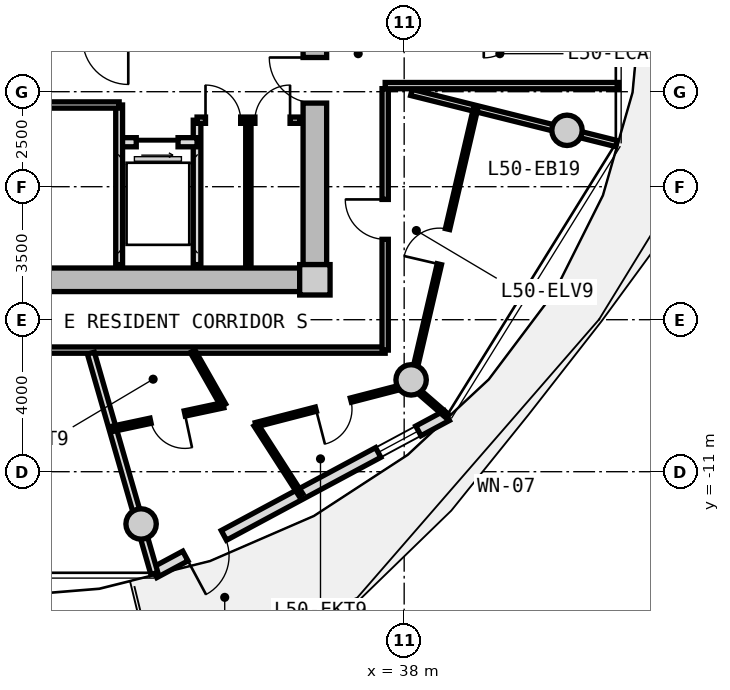
"""IFC4 building model, lengths in metres.
Left out: names, types, materials, properties, quantities, classifications, styles, units other than length and angle.
Written with IfcOpenShell. Run it as: python <this file> out.ifc"""

import sys

from ifc_helpers import new_model, si_unit, direction, frame, frame_2d, origin, origin_2d, place, context, subcontext, project, spatial, rectangle, circle, extrude, source, transform, mapped, element, fill, save


model = new_model("IFC4")
c1 = context("Model", 3, precision=1e-05, world=origin(), true_north=direction((0.0, 1.0)))
c2 = subcontext(c1, "Body", "Model", "MODEL_VIEW")
j1 = project(units=[si_unit("LENGTHUNIT", "METRE"), si_unit("PLANEANGLEUNIT", "RADIAN")], contexts=[c1])
p1 = place(None, origin())
s1 = spatial("IfcSite", under=j1, at=p1, CompositionType="ELEMENT")
p2 = place(p1, origin())
s2 = spatial("IfcBuilding", under=s1, at=p2, CompositionType="ELEMENT")
p3 = place(p2, frame((0.0, 0.0, 161.75)))
s3 = spatial("IfcBuildingStorey", under=s2, at=p3, CompositionType="ELEMENT", Elevation=161.75)
m1 = source(origin(), c2, "Body", "SweptSolid", [
    extrude(rectangle(XDim=0.8, YDim=0.8, at=origin_2d()), origin(), (0.0, 0.0, 1.0), 3.05),
])
p4 = place(p3, frame((35.65, -5.95, 0.0), z_axis=(0.0, 0.0, 1.0), x_axis=(1.0, 0.0, 0.0)))
e1 = element("IfcColumn", 1, at=p4, inside=s3, PredefinedType="COLUMN", context=c2, shape_type="MappedRepresentation", body=[
    mapped(m1, transform((0.0, 0.0, 0.0), x_axis=(1.0, 0.0, 0.0), y_axis=(0.0, 1.0, 0.0), z_axis=(0.0, 0.0, 1.0), scale=1.0)),
])
m2 = source(origin(), c2, "Body", "SweptSolid", [
    extrude(rectangle(XDim=14.5, YDim=0.62, at=frame_2d((7.25, 0.0))), origin(), (0.0, 0.0, 1.0), 2.81),
])
p5 = place(p3, frame((35.25, -5.95, 0.0), z_axis=(0.0, 0.0, 1.0), x_axis=(-1.0, 0.0, 0.0)))
e2 = element("IfcWall", 2, at=p5, inside=s3, PredefinedType="SHEAR", context=c2, shape_type="MappedRepresentation", body=[
    mapped(m2, transform((0.0, 0.0, 0.0), x_axis=(1.0, 0.0, 0.0), y_axis=(0.0, 1.0, 0.0), z_axis=(0.0, 0.0, 1.0), scale=1.0)),
])
m3 = source(origin(), c2, "Body", "SweptSolid", [
    extrude(rectangle(XDim=11.1, YDim=0.62, at=frame_2d((5.55, 0.0))), origin(), (0.0, 0.0, 1.0), 2.81),
])
p6 = place(p3, frame((35.65, 5.55, 0.0), z_axis=(0.0, 0.0, 1.0), x_axis=(0.0, -1.0, 0.0)))
e3 = element("IfcWall", 3, at=p6, inside=s3, PredefinedType="SHEAR", context=c2, shape_type="MappedRepresentation", body=[
    mapped(m3, transform((0.0, 0.0, 0.0), x_axis=(1.0, 0.0, 0.0), y_axis=(0.0, 1.0, 0.0), z_axis=(0.0, 0.0, 1.0), scale=1.0)),
])
p7 = place(p6, frame((5.65, 0.0, 0.0)))
e4 = element("IfcOpeningElement", 4, at=p7, cuts=e3, PredefinedType="OPENING", context=c2, shape_type="SweptSolid", body=[
    extrude(rectangle(XDim=1.2, YDim=2.15, at=frame_2d((0.6, 1.075))), frame((0.0, 0.32, 0.0), z_axis=(0.0, -1.0, 0.0), x_axis=(1.0, 0.0, 0.0)), (0.0, 0.0, 1.0), 0.64),
])
m4 = source(origin(), c2, "Body", "SweptSolid", [
    extrude(circle(Radius=0.4, at=origin_2d()), origin(), (0.0, 0.0, 1.0), 3.05),
])
for number, where, z_axis, x_axis in (
    (5, (31.077, -12.375, 0.0), (0.0, 0.0, 1.0), (1.0, 0.0, 0.0)),
    (6, (38.183, -8.584, 0.0), (0.0, 0.0, 1.0), (1.0, 0.0, 0.0)),
    (7, (42.285, -2.016, 0.0), (0.0, 0.0, 1.0), (1.0, 0.0, 0.0)),
):
    element("IfcColumn", number, at=place(p3, frame(where, z_axis=z_axis, x_axis=x_axis)), inside=s3, PredefinedType="COLUMN", context=c2, shape_type="MappedRepresentation", body=[
        mapped(m4, transform((0.0, 0.0, 0.0), x_axis=(1.0, 0.0, 0.0), y_axis=(0.0, 1.0, 0.0), z_axis=(0.0, 0.0, 1.0), scale=1.0)),
    ])
m5 = source(origin(), c2, "Body", "SweptSolid", [
    extrude(rectangle(XDim=8.742, YDim=0.29, at=frame_2d((4.371, 0.0))), origin(), (0.0, 0.0, 1.0), 2.81),
])
p8 = place(p3, frame((39.123, -9.524, 0.0), z_axis=(0.0, 0.0, 1.0), x_axis=(-0.880992489116, -0.473130250693, 0.0)))
e8 = element("IfcWall", 8, at=p8, inside=s3, PredefinedType="SOLIDWALL", context=c2, shape_type="MappedRepresentation", body=[
    mapped(m5, transform((0.0, 0.0, 0.0), x_axis=(1.0, 0.0, 0.0), y_axis=(0.0, 1.0, 0.0), z_axis=(0.0, 0.0, 1.0), scale=1.0)),
])
p9 = place(p8, frame((6.66, 0.0, 0.0)))
e9 = element("IfcOpeningElement", 9, at=p9, cuts=e8, PredefinedType="OPENING", context=c2, shape_type="SweptSolid", body=[
    extrude(rectangle(XDim=1.15, YDim=2.25, at=frame_2d((0.575, 1.125))), frame((0.0, 0.155, 0.0), z_axis=(0.0, -1.0, 0.0), x_axis=(1.0, 0.0, 0.0)), (0.0, 0.0, 1.0), 0.31),
])
p10 = place(p8, frame((0.85, 0.0, 0.85)))
e10 = element("IfcOpeningElement", 10, at=p10, cuts=e8, PredefinedType="OPENING", context=c2, shape_type="SweptSolid", body=[
    extrude(rectangle(XDim=1.2, YDim=1.5, at=frame_2d((0.6, 0.75))), frame((0.0, 0.155, 0.0), z_axis=(0.0, -1.0, 0.0), x_axis=(1.0, 0.0, 0.0)), (0.0, 0.0, 1.0), 0.31),
])
m6 = source(origin(), c2, "Body", "SweptSolid", [
    extrude(rectangle(XDim=3.8, YDim=0.2, at=frame_2d((1.9, 0.0))), origin(), (0.0, 0.0, 1.0), 2.795),
])
p11 = place(p3, frame((32.55, -5.55, 0.0), z_axis=(0.0, 0.0, 1.0), x_axis=(0.0, 1.0, 0.0)))
e11 = element("IfcWall", 11, at=p11, inside=s3, PredefinedType="PARTITIONING", context=c2, shape_type="MappedRepresentation", body=[
    mapped(m6, transform((0.0, 0.0, 0.0), x_axis=(1.0, 0.0, 0.0), y_axis=(0.0, 1.0, 0.0), z_axis=(0.0, 0.0, 1.0), scale=1.0)),
])
m7 = source(origin(), c2, "Body", "SweptSolid", [
    extrude(rectangle(XDim=2.05, YDim=0.24, at=frame_2d((1.025, 0.0))), origin(), (0.0, 0.0, 1.0), 2.795),
])
p12 = place(p3, frame((30.5, -2.33, 0.0), z_axis=(0.0, 0.0, 1.0), x_axis=(1.0, 0.0, 0.0)))
e12 = element("IfcWall", 12, at=p12, inside=s3, PredefinedType="PARTITIONING", context=c2, shape_type="MappedRepresentation", body=[
    mapped(m7, transform((0.0, 0.0, 0.0), x_axis=(1.0, 0.0, 0.0), y_axis=(0.0, 1.0, 0.0), z_axis=(0.0, 0.0, 1.0), scale=1.0)),
])
p13 = place(p12, frame((0.45, 0.0, 0.0)))
e13 = element("IfcOpeningElement", 13, at=p13, cuts=e12, PredefinedType="OPENING", context=c2, shape_type="SweptSolid", body=[
    extrude(rectangle(XDim=1.1, YDim=2.2, at=frame_2d((0.55, 1.1))), frame((0.0, 0.13, 0.0), z_axis=(0.0, -1.0, 0.0), x_axis=(1.0, 0.0, 0.0)), (0.0, 0.0, 1.0), 0.26),
])
m8 = source(origin(), c2, "Body", "SweptSolid", [
    extrude(rectangle(XDim=4.2, YDim=0.18, at=frame_2d((2.1, 0.0))), origin(), (0.0, 0.0, 1.0), 2.795),
])
p14 = place(p3, frame((30.5, -5.55, 0.0), z_axis=(0.0, 0.0, 1.0), x_axis=(0.0, 1.0, 0.0)))
e14 = element("IfcWall", 14, at=p14, inside=s3, PredefinedType="PARTITIONING", context=c2, shape_type="MappedRepresentation", body=[
    mapped(m8, transform((0.0, 0.0, 0.0), x_axis=(1.0, 0.0, 0.0), y_axis=(0.0, 1.0, 0.0), z_axis=(0.0, 0.0, 1.0), scale=1.0)),
])
m9 = source(origin(), c2, "Body", "SweptSolid", [
    extrude(rectangle(XDim=4.77, YDim=0.165, at=frame_2d((2.385, 0.0))), origin(), (0.0, 0.0, 1.0), 2.795),
])
p15 = place(p3, frame((25.73, -1.35, 0.0), z_axis=(0.0, 0.0, 1.0), x_axis=(1.0, 0.0, 0.0)))
e15 = element("IfcWall", 15, at=p15, inside=s3, PredefinedType="PARTITIONING", context=c2, shape_type="MappedRepresentation", body=[
    mapped(m9, transform((0.0, 0.0, 0.0), x_axis=(1.0, 0.0, 0.0), y_axis=(0.0, 1.0, 0.0), z_axis=(0.0, 0.0, 1.0), scale=1.0)),
])
p16 = place(p15, frame((1.85, 0.0, 0.0)))
e16 = element("IfcOpeningElement", 16, at=p16, cuts=e15, PredefinedType="OPENING", context=c2, shape_type="SweptSolid", body=[
    extrude(rectangle(XDim=1.0, YDim=2.1, at=frame_2d((0.5, 1.05))), frame((0.0, 0.093, 0.0), z_axis=(0.0, -1.0, 0.0), x_axis=(1.0, 0.0, 0.0)), (0.0, 0.0, 1.0), 0.185),
])
m10 = source(origin(), c2, "Body", "SweptSolid", [
    extrude(rectangle(XDim=2.7, YDim=0.165, at=frame_2d((1.35, 0.0))), origin(), (0.0, 0.0, 1.0), 2.795),
])
p17 = place(p3, frame((32.55, -1.75, 0.0), z_axis=(0.0, 0.0, 1.0), x_axis=(1.0, 0.0, 0.0)))
e17 = element("IfcWall", 17, at=p17, inside=s3, PredefinedType="PARTITIONING", context=c2, shape_type="MappedRepresentation", body=[
    mapped(m10, transform((0.0, 0.0, 0.0), x_axis=(1.0, 0.0, 0.0), y_axis=(0.0, 1.0, 0.0), z_axis=(0.0, 0.0, 1.0), scale=1.0)),
])
p18 = place(p17, frame((0.222, 0.0, 0.0)))
e18 = element("IfcOpeningElement", 18, at=p18, cuts=e17, PredefinedType="OPENING", context=c2, shape_type="SweptSolid", body=[
    extrude(rectangle(XDim=0.925, YDim=2.1, at=frame_2d((0.462, 1.05))), frame((0.0, 0.093, 0.0), z_axis=(0.0, -1.0, 0.0), x_axis=(1.0, 0.0, 0.0)), (0.0, 0.0, 1.0), 0.185),
])
p19 = place(p17, frame((1.522, 0.0, 0.0)))
e19 = element("IfcOpeningElement", 19, at=p19, cuts=e17, PredefinedType="OPENING", context=c2, shape_type="SweptSolid", body=[
    extrude(rectangle(XDim=0.925, YDim=2.1, at=frame_2d((0.462, 1.05))), frame((0.0, 0.093, 0.0), z_axis=(0.0, -1.0, 0.0), x_axis=(1.0, 0.0, 0.0)), (0.0, 0.0, 1.0), 0.185),
])
m11 = source(origin(), c2, "Body", "SweptSolid", [
    extrude(rectangle(XDim=3.8, YDim=0.14, at=frame_2d((1.9, 0.0))), origin(), (0.0, 0.0, 1.0), 2.795),
])
p20 = place(p3, frame((33.9, -5.55, 0.0), z_axis=(0.0, 0.0, 1.0), x_axis=(0.0, 1.0, 0.0)))
e20 = element("IfcWall", 20, at=p20, inside=s3, PredefinedType="PARTITIONING", context=c2, shape_type="MappedRepresentation", body=[
    mapped(m11, transform((0.0, 0.0, 0.0), x_axis=(1.0, 0.0, 0.0), y_axis=(0.0, 1.0, 0.0), z_axis=(0.0, 0.0, 1.0), scale=1.0)),
])
m12 = source(origin(), c2, "Body", "SweptSolid", [
    extrude(rectangle(XDim=19.0, YDim=0.165, at=frame_2d((9.5, 0.0))), origin(), (0.0, 0.0, 1.0), 2.795),
])
p21 = place(p3, frame((37.5, -7.8, 0.0), z_axis=(0.0, 0.0, 1.0), x_axis=(-1.0, 0.0, 0.0)))
e21 = element("IfcWall", 21, at=p21, inside=s3, PredefinedType="PARTITIONING", context=c2, shape_type="MappedRepresentation", body=[
    mapped(m12, transform((0.0, 0.0, 0.0), x_axis=(1.0, 0.0, 0.0), y_axis=(0.0, 1.0, 0.0), z_axis=(0.0, 0.0, 1.0), scale=1.0)),
])
p22 = place(p21, frame((12.623, 0.0, 0.0)))
e22 = element("IfcOpeningElement", 22, at=p22, cuts=e21, PredefinedType="OPENING", context=c2, shape_type="SweptSolid", body=[
    extrude(rectangle(XDim=1.25, YDim=2.2, at=frame_2d((0.625, 1.1))), frame((0.0, 0.093, 0.0), z_axis=(0.0, -1.0, 0.0), x_axis=(1.0, 0.0, 0.0)), (0.0, 0.0, 1.0), 0.185),
])
m13 = source(origin(), c2, "Body", "SweptSolid", [
    extrude(rectangle(XDim=6.88, YDim=0.165, at=frame_2d((3.44, 0.0))), origin(), (0.0, 0.0, 1.0), 2.795),
])
p23 = place(p3, frame((37.5, -0.92, 0.0), z_axis=(0.0, 0.0, 1.0), x_axis=(0.0, -1.0, 0.0)))
e23 = element("IfcWall", 23, at=p23, inside=s3, PredefinedType="PARTITIONING", context=c2, shape_type="MappedRepresentation", body=[
    mapped(m13, transform((0.0, 0.0, 0.0), x_axis=(1.0, 0.0, 0.0), y_axis=(0.0, 1.0, 0.0), z_axis=(0.0, 0.0, 1.0), scale=1.0)),
])
p24 = place(p23, frame((2.915, 0.0, 0.0)))
e24 = element("IfcOpeningElement", 24, at=p24, cuts=e23, PredefinedType="OPENING", context=c2, shape_type="SweptSolid", body=[
    extrude(rectangle(XDim=1.05, YDim=2.15, at=frame_2d((0.525, 1.075))), frame((0.0, 0.093, 0.0), z_axis=(0.0, -1.0, 0.0), x_axis=(1.0, 0.0, 0.0)), (0.0, 0.0, 1.0), 0.185),
])
m14 = source(origin(), c2, "Body", "SweptSolid", [
    extrude(rectangle(XDim=5.564, YDim=0.165, at=frame_2d((2.782, 0.0))), origin(), (0.0, 0.0, 1.0), 2.345),
])
p25 = place(p3, frame((38.19, -1.02, 0.0), z_axis=(0.0, 0.0, 1.0), x_axis=(0.97031260977, -0.241854169533, 0.0)))
e25 = element("IfcWall", 25, at=p25, inside=s3, PredefinedType="PARTITIONING", context=c2, shape_type="MappedRepresentation", body=[
    mapped(m14, transform((0.0, 0.0, 0.0), x_axis=(1.0, 0.0, 0.0), y_axis=(0.0, 1.0, 0.0), z_axis=(0.0, 0.0, 1.0), scale=1.0)),
])
m15 = source(origin(), c2, "Body", "SweptSolid", [
    extrude(rectangle(XDim=6.139, YDim=0.165, at=frame_2d((3.069, 0.0))), origin(), (0.0, 0.0, 1.0), 2.795),
])
p26 = place(p3, frame((43.639, -0.84, 0.0), z_axis=(0.0, 0.0, 1.0), x_axis=(-1.0, 0.0, 0.0)))
e26 = element("IfcWall", 26, at=p26, inside=s3, PredefinedType="PARTITIONING", context=c2, shape_type="MappedRepresentation", body=[
    mapped(m15, transform((0.0, 0.0, 0.0), x_axis=(1.0, 0.0, 0.0), y_axis=(0.0, 1.0, 0.0), z_axis=(0.0, 0.0, 1.0), scale=1.0)),
])
m16 = source(origin(), c2, "Body", "SweptSolid", [
    extrude(rectangle(XDim=6.035, YDim=0.19, at=frame_2d((3.018, 0.0))), origin(), (0.0, 0.0, 1.0), 2.345),
])
p27 = place(p3, frame((29.756, -7.88, 0.0), z_axis=(0.0, 0.0, 1.0), x_axis=(0.276809454862, -0.960924828329, 0.0)))
e27 = element("IfcWall", 27, at=p27, inside=s3, PredefinedType="PARTITIONING", context=c2, shape_type="MappedRepresentation", body=[
    mapped(m16, transform((0.0, 0.0, 0.0), x_axis=(1.0, 0.0, 0.0), y_axis=(0.0, 1.0, 0.0), z_axis=(0.0, 0.0, 1.0), scale=1.0)),
])
m17 = source(origin(), c2, "Body", "SweptSolid", [
    extrude(rectangle(XDim=7.469, YDim=0.115, at=frame_2d((3.734, 0.0))), origin(), (0.0, 0.0, 1.0), 2.795),
])
p28 = place(p3, frame((38.187, -8.715, 0.0), z_axis=(0.0, 0.0, 1.0), x_axis=(0.226790420763, 0.973943584121, 0.0)))
e28 = element("IfcWall", 28, at=p28, inside=s3, PredefinedType="PARTITIONING", context=c2, shape_type="MappedRepresentation", body=[
    mapped(m17, transform((0.0, 0.0, 0.0), x_axis=(1.0, 0.0, 0.0), y_axis=(0.0, 1.0, 0.0), z_axis=(0.0, 0.0, 1.0), scale=1.0)),
])
p29 = place(p28, frame((3.259, 0.0, 0.0)))
e29 = element("IfcOpeningElement", 29, at=p29, cuts=e28, PredefinedType="OPENING", context=c2, shape_type="SweptSolid", body=[
    extrude(rectangle(XDim=0.95, YDim=2.1, at=frame_2d((0.475, 1.05))), frame((0.0, 0.067, 0.0), z_axis=(0.0, -1.0, 0.0), x_axis=(1.0, 0.0, 0.0)), (0.0, 0.0, 1.0), 0.135),
])
m18 = source(origin(), c2, "Body", "SweptSolid", [
    extrude(rectangle(XDim=1.258, YDim=0.115, at=frame_2d((0.629, 0.0))), origin(), (0.0, 0.0, 1.0), 2.795),
])
p30 = place(p3, frame((38.187, -8.715, 0.0), z_axis=(0.0, 0.0, 1.0), x_axis=(0.755765923317, -0.654841865761, 0.0)))
e30 = element("IfcWall", 30, at=p30, inside=s3, PredefinedType="PARTITIONING", context=c2, shape_type="MappedRepresentation", body=[
    mapped(m18, transform((0.0, 0.0, 0.0), x_axis=(1.0, 0.0, 0.0), y_axis=(0.0, 1.0, 0.0), z_axis=(0.0, 0.0, 1.0), scale=1.0)),
])
m19 = source(origin(), c2, "Body", "SweptSolid", [
    extrude(rectangle(XDim=1.635, YDim=0.14, at=frame_2d((0.817, 0.0))), origin(), (0.0, 0.0, 1.0), 2.795),
])
p31 = place(p3, frame((32.434, -7.83, 0.0), z_axis=(0.0, 0.0, 1.0), x_axis=(0.494078690764, -0.869417188312, 0.0)))
e31 = element("IfcWall", 31, at=p31, inside=s3, PredefinedType="PARTITIONING", context=c2, shape_type="MappedRepresentation", body=[
    mapped(m19, transform((0.0, 0.0, 0.0), x_axis=(1.0, 0.0, 0.0), y_axis=(0.0, 1.0, 0.0), z_axis=(0.0, 0.0, 1.0), scale=1.0)),
])
m20 = source(origin(), c2, "Body", "SweptSolid", [
    extrude(rectangle(XDim=2.995, YDim=0.14, at=frame_2d((1.498, 0.0))), origin(), (0.0, 0.0, 1.0), 2.435),
])
p32 = place(p3, frame((33.241, -9.251, 0.0), z_axis=(0.0, 0.0, 1.0), x_axis=(-0.978075914325, -0.208248663425, 0.0)))
e32 = element("IfcWall", 32, at=p32, inside=s3, PredefinedType="PARTITIONING", context=c2, shape_type="MappedRepresentation", body=[
    mapped(m20, transform((0.0, 0.0, 0.0), x_axis=(1.0, 0.0, 0.0), y_axis=(0.0, 1.0, 0.0), z_axis=(0.0, 0.0, 1.0), scale=1.0)),
])
p33 = place(p32, frame((1.038, 0.0, 0.0)))
e33 = element("IfcOpeningElement", 33, at=p33, cuts=e32, PredefinedType="OPENING", context=c2, shape_type="SweptSolid", body=[
    extrude(rectangle(XDim=0.92, YDim=2.1, at=frame_2d((0.46, 1.05))), frame((0.0, 0.08, 0.0), z_axis=(0.0, -1.0, 0.0), x_axis=(1.0, 0.0, 0.0)), (0.0, 0.0, 1.0), 0.16),
])
m21 = source(origin(), c2, "Body", "SweptSolid", [
    extrude(rectangle(XDim=2.194, YDim=0.115, at=frame_2d((1.097, 0.0))), origin(), (0.0, 0.0, 1.0), 2.795),
])
p34 = place(p3, frame((34.095, -9.764, 0.0), z_axis=(0.0, 0.0, 1.0), x_axis=(0.540858831194, -0.841113383985, 0.0)))
e34 = element("IfcWall", 34, at=p34, inside=s3, PredefinedType="PARTITIONING", context=c2, shape_type="MappedRepresentation", body=[
    mapped(m21, transform((0.0, 0.0, 0.0), x_axis=(1.0, 0.0, 0.0), y_axis=(0.0, 1.0, 0.0), z_axis=(0.0, 0.0, 1.0), scale=1.0)),
])
m22 = source(origin(), c2, "Body", "SweptSolid", [
    extrude(rectangle(XDim=4.218, YDim=0.115, at=frame_2d((2.109, 0.0))), origin(), (0.0, 0.0, 1.0), 2.345),
])
p35 = place(p3, frame((34.095, -9.764, 0.0), z_axis=(0.0, 0.0, 1.0), x_axis=(0.968124892577, 0.250467946797, 0.0)))
e35 = element("IfcWall", 35, at=p35, inside=s3, PredefinedType="PARTITIONING", context=c2, shape_type="MappedRepresentation", body=[
    mapped(m22, transform((0.0, 0.0, 0.0), x_axis=(1.0, 0.0, 0.0), y_axis=(0.0, 1.0, 0.0), z_axis=(0.0, 0.0, 1.0), scale=1.0)),
])
p36 = place(p35, frame((1.634, 0.0, 0.0)))
e36 = element("IfcOpeningElement", 36, at=p36, cuts=e35, PredefinedType="OPENING", context=c2, shape_type="SweptSolid", body=[
    extrude(rectangle(XDim=0.95, YDim=2.1, at=frame_2d((0.475, 1.05))), frame((0.0, 0.067, 0.0), z_axis=(0.0, -1.0, 0.0), x_axis=(1.0, 0.0, 0.0)), (0.0, 0.0, 1.0), 0.135),
])
m23 = source(origin(), c2, "Body", "SweptSolid", [
    extrude(rectangle(XDim=1.15, YDim=2.25, at=frame_2d((0.575, 1.125))), frame((0.0, 0.025, 0.0), z_axis=(0.0, -1.0, 0.0), x_axis=(1.0, 0.0, 0.0)), (0.0, 0.0, 1.0), 0.05),
])
p37 = place(p9, origin())
e37 = element("IfcDoor", 37, at=p37, inside=s3, OperationType="SINGLE_SWING_RIGHT", PredefinedType="DOOR", context=c2, shape_type="MappedRepresentation", body=[
    mapped(m23, transform((0.0, 0.0, 0.0), x_axis=(1.0, 0.0, 0.0), y_axis=(0.0, 1.0, 0.0), z_axis=(0.0, 0.0, 1.0), scale=1.0)),
])
fill(e9, e37)
m24 = source(origin(), c2, "Body", "SweptSolid", [
    extrude(rectangle(XDim=1.2, YDim=1.5, at=frame_2d((0.6, 0.75))), frame((0.0, 0.03, 0.0), z_axis=(0.0, -1.0, 0.0), x_axis=(1.0, 0.0, 0.0)), (0.0, 0.0, 1.0), 0.06),
])
p38 = place(p10, origin())
e38 = element("IfcWindow", 38, at=p38, inside=s3, PartitioningType="SINGLE_PANEL", PredefinedType="WINDOW", context=c2, shape_type="MappedRepresentation", body=[
    mapped(m24, transform((0.0, 0.0, 0.0), x_axis=(1.0, 0.0, 0.0), y_axis=(0.0, 1.0, 0.0), z_axis=(0.0, 0.0, 1.0), scale=1.0)),
])
fill(e10, e38)
m25 = source(origin(), c2, "Body", "SweptSolid", [
    extrude(rectangle(XDim=1.2, YDim=2.15, at=frame_2d((0.6, 1.075))), frame((0.0, 0.025, 0.0), z_axis=(0.0, -1.0, 0.0), x_axis=(1.0, 0.0, 0.0)), (0.0, 0.0, 1.0), 0.05),
])
p39 = place(p7, frame((1.2, 0.0, 0.0), z_axis=(0.0, 0.0, 1.0), x_axis=(-1.0, 0.0, 0.0)))
e39 = element("IfcDoor", 39, at=p39, inside=s3, OperationType="SINGLE_SWING_RIGHT", PredefinedType="DOOR", context=c2, shape_type="MappedRepresentation", body=[
    mapped(m25, transform((0.0, 0.0, 0.0), x_axis=(1.0, 0.0, 0.0), y_axis=(0.0, 1.0, 0.0), z_axis=(0.0, 0.0, 1.0), scale=1.0)),
])
fill(e4, e39)
m26 = source(origin(), c2, "Body", "SweptSolid", [
    extrude(rectangle(XDim=1.1, YDim=2.2, at=frame_2d((0.55, 1.1))), frame((0.0, 0.025, 0.0), z_axis=(0.0, -1.0, 0.0), x_axis=(1.0, 0.0, 0.0)), (0.0, 0.0, 1.0), 0.05),
])
p40 = place(p13, frame((1.1, 0.0, 0.0), z_axis=(0.0, 0.0, 1.0), x_axis=(-1.0, 0.0, 0.0)))
e40 = element("IfcDoor", 40, at=p40, inside=s3, OperationType="SLIDING_TO_RIGHT", PredefinedType="DOOR", context=c2, shape_type="MappedRepresentation", body=[
    mapped(m26, transform((0.0, 0.0, 0.0), x_axis=(1.0, 0.0, 0.0), y_axis=(0.0, 1.0, 0.0), z_axis=(0.0, 0.0, 1.0), scale=1.0)),
])
fill(e13, e40)
m27 = source(origin(), c2, "Body", "SweptSolid", [
    extrude(rectangle(XDim=0.925, YDim=2.1, at=frame_2d((0.462, 1.05))), frame((0.0, 0.025, 0.0), z_axis=(0.0, -1.0, 0.0), x_axis=(1.0, 0.0, 0.0)), (0.0, 0.0, 1.0), 0.05),
])
p41 = place(p18, origin())
e41 = element("IfcDoor", 41, at=p41, inside=s3, OperationType="SINGLE_SWING_LEFT", PredefinedType="DOOR", context=c2, shape_type="MappedRepresentation", body=[
    mapped(m27, transform((0.0, 0.0, 0.0), x_axis=(1.0, 0.0, 0.0), y_axis=(0.0, 1.0, 0.0), z_axis=(0.0, 0.0, 1.0), scale=1.0)),
])
fill(e18, e41)
p42 = place(p19, origin())
e42 = element("IfcDoor", 42, at=p42, inside=s3, OperationType="SINGLE_SWING_RIGHT", PredefinedType="DOOR", context=c2, shape_type="MappedRepresentation", body=[
    mapped(m27, transform((0.0, 0.0, 0.0), x_axis=(1.0, 0.0, 0.0), y_axis=(0.0, 1.0, 0.0), z_axis=(0.0, 0.0, 1.0), scale=1.0)),
])
fill(e19, e42)
m28 = source(origin(), c2, "Body", "SweptSolid", [
    extrude(rectangle(XDim=1.05, YDim=2.15, at=frame_2d((0.525, 1.075))), frame((0.0, 0.025, 0.0), z_axis=(0.0, -1.0, 0.0), x_axis=(1.0, 0.0, 0.0)), (0.0, 0.0, 1.0), 0.05),
])
p43 = place(p24, frame((1.05, 0.0, 0.0), z_axis=(0.0, 0.0, 1.0), x_axis=(-1.0, 0.0, 0.0)))
e43 = element("IfcDoor", 43, at=p43, inside=s3, OperationType="SINGLE_SWING_RIGHT", PredefinedType="DOOR", context=c2, shape_type="MappedRepresentation", body=[
    mapped(m28, transform((0.0, 0.0, 0.0), x_axis=(1.0, 0.0, 0.0), y_axis=(0.0, 1.0, 0.0), z_axis=(0.0, 0.0, 1.0), scale=1.0)),
])
fill(e24, e43)
m29 = source(origin(), c2, "Body", "SweptSolid", [
    extrude(rectangle(XDim=0.92, YDim=2.1, at=frame_2d((0.46, 1.05))), frame((0.0, 0.025, 0.0), z_axis=(0.0, -1.0, 0.0), x_axis=(1.0, 0.0, 0.0)), (0.0, 0.0, 1.0), 0.05),
])
p44 = place(p33, origin())
e44 = element("IfcDoor", 44, at=p44, inside=s3, OperationType="SINGLE_SWING_LEFT", PredefinedType="DOOR", context=c2, shape_type="MappedRepresentation", body=[
    mapped(m29, transform((0.0, 0.0, 0.0), x_axis=(1.0, 0.0, 0.0), y_axis=(0.0, 1.0, 0.0), z_axis=(0.0, 0.0, 1.0), scale=1.0)),
])
fill(e33, e44)
m30 = source(origin(), c2, "Body", "SweptSolid", [
    extrude(rectangle(XDim=0.95, YDim=2.1, at=frame_2d((0.475, 1.05))), frame((0.0, 0.025, 0.0), z_axis=(0.0, -1.0, 0.0), x_axis=(1.0, 0.0, 0.0)), (0.0, 0.0, 1.0), 0.05),
])
p45 = place(p36, frame((0.95, 0.0, 0.0), z_axis=(0.0, 0.0, 1.0), x_axis=(-1.0, 0.0, 0.0)))
e45 = element("IfcDoor", 45, at=p45, inside=s3, OperationType="SINGLE_SWING_RIGHT", PredefinedType="DOOR", context=c2, shape_type="MappedRepresentation", body=[
    mapped(m30, transform((0.0, 0.0, 0.0), x_axis=(1.0, 0.0, 0.0), y_axis=(0.0, 1.0, 0.0), z_axis=(0.0, 0.0, 1.0), scale=1.0)),
])
fill(e36, e45)
p46 = place(p29, origin())
e46 = element("IfcDoor", 46, at=p46, inside=s3, OperationType="SINGLE_SWING_LEFT", PredefinedType="DOOR", context=c2, shape_type="MappedRepresentation", body=[
    mapped(m30, transform((0.0, 0.0, 0.0), x_axis=(1.0, 0.0, 0.0), y_axis=(0.0, 1.0, 0.0), z_axis=(0.0, 0.0, 1.0), scale=1.0)),
])
fill(e29, e46)
save(model, sys.argv[1])
